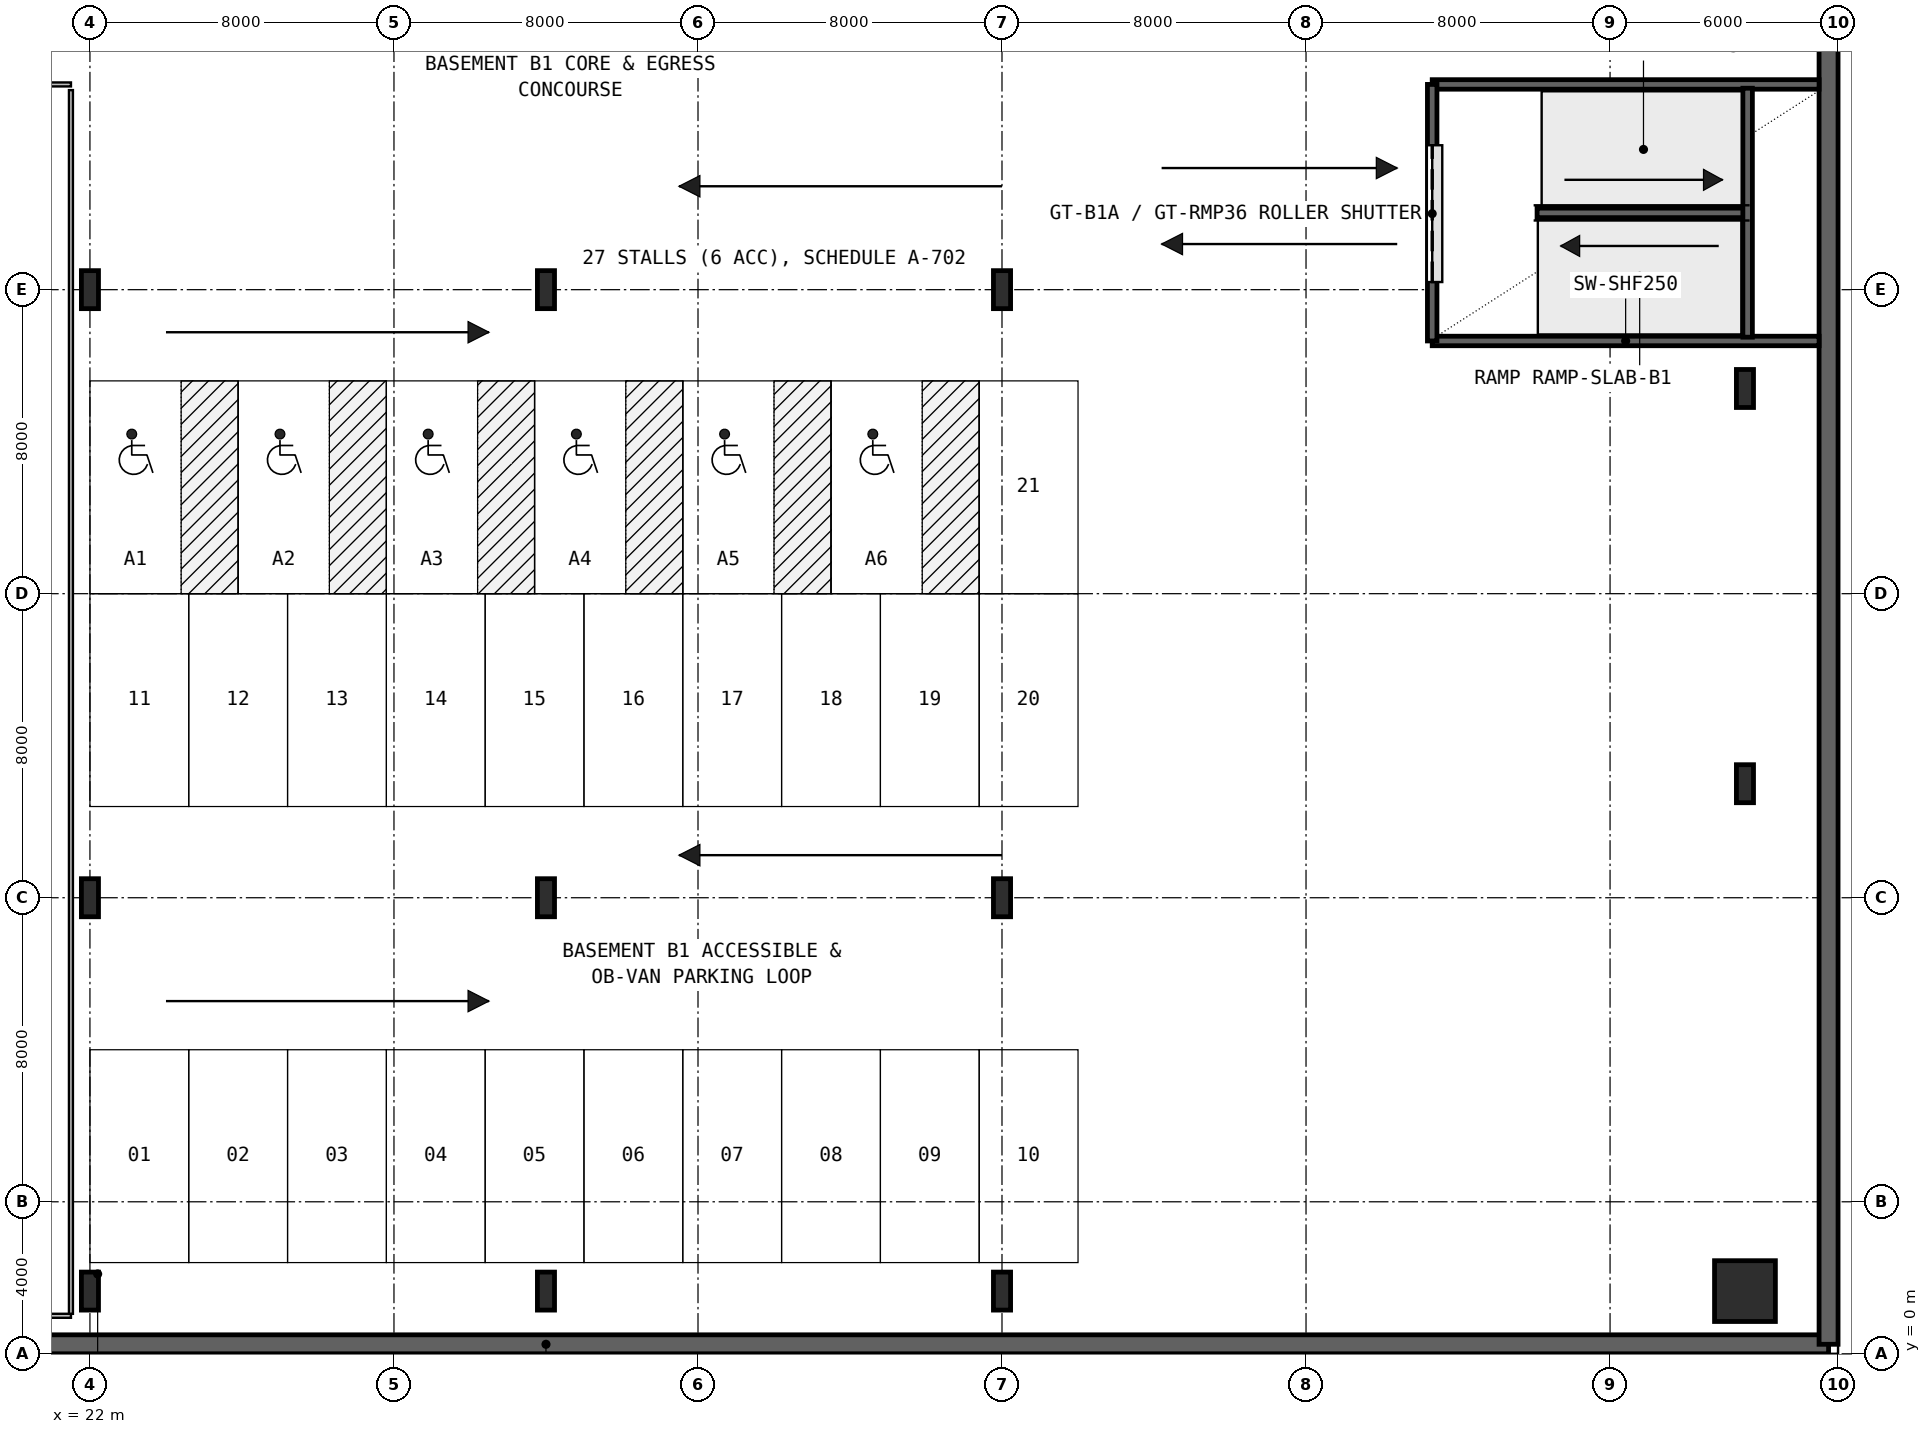
"""IFC4 building model, lengths in metres.
Left out: names, types, materials, properties, quantities, classifications, styles, units other than length and angle.
Written with IfcOpenShell. Run it as: python <this file> out.ifc"""

import sys

from ifc_helpers import new_model, si_unit, direction, frame, frame_2d, origin, origin_2d, place, context, subcontext, project, spatial, rectangle, hollow_rectangle, i_section, extrude, source, transform, mapped, element, fill, save


model = new_model("IFC4")
c1 = context("Model", 3, precision=1e-05, world=origin(), true_north=direction((0.0, 1.0)))
c2 = subcontext(c1, "Body", "Model", "MODEL_VIEW")
j1 = project(units=[si_unit("LENGTHUNIT", "METRE"), si_unit("PLANEANGLEUNIT", "RADIAN")], contexts=[c1])
p1 = place(None, origin())
s1 = spatial("IfcSite", under=j1, at=p1, CompositionType="ELEMENT")
p2 = place(p1, origin())
s2 = spatial("IfcBuilding", under=s1, at=p2, CompositionType="ELEMENT")
p3 = place(p2, frame((0.0, 0.0, -4.8)))
s3 = spatial("IfcBuildingStorey", under=s2, at=p3, CompositionType="ELEMENT", Elevation=-4.8)
p4 = place(p3, frame((0.25, 0.25, 0.0), z_axis=(0.0, 0.0, 1.0), x_axis=(1.0, 0.0, 0.0)))
e1 = element("IfcWall", 1, at=p4, inside=s3, PredefinedType="USERDEFINED", context=c2, shape_type="SweptSolid", body=[
    extrude(rectangle(XDim=67.5, YDim=0.5, at=frame_2d((33.75, 0.0))), origin(), (0.0, 0.0, 1.0), 4.48),
])
p5 = place(p3, frame((67.75, 0.25, 0.0), z_axis=(0.0, 0.0, 1.0), x_axis=(0.0, 1.0, 0.0)))
e2 = element("IfcWall", 2, at=p5, inside=s3, PredefinedType="USERDEFINED", context=c2, shape_type="SweptSolid", body=[
    extrude(rectangle(XDim=47.5, YDim=0.5, at=frame_2d((23.75, 0.0))), origin(), (0.0, 0.0, 1.0), 4.48),
])
m1 = source(origin(), c2, "Body", "SweptSolid", [
    extrude(hollow_rectangle(XDim=1.6, YDim=1.6, WallThickness=0.06, at=origin_2d()), origin(), (0.0, 0.0, 1.0), 4.8),
])
p6 = place(p3, frame((65.55, 1.65, 0.0), z_axis=(0.0, 0.0, 1.0), x_axis=(1.0, 0.0, 0.0)))
e3 = element("IfcColumn", 3, at=p6, inside=s3, PredefinedType="COLUMN", context=c2, shape_type="MappedRepresentation", body=[
    mapped(m1, transform((0.0, 0.0, 0.0), x_axis=(1.0, 0.0, 0.0), y_axis=(0.0, 1.0, 0.0), z_axis=(0.0, 0.0, 1.0), scale=1.0)),
])
m2 = source(origin(), c2, "Body", "SweptSolid", [
    extrude(i_section(OverallWidth=0.45, OverallDepth=1.0, WebThickness=0.016, FlangeThickness=0.03, FilletRadius=0.016, at=origin_2d()), origin(), (0.0, 0.0, 1.0), 4.8),
])
for number, where, z_axis, x_axis in (
    (4, (22.0, 1.65, 0.0), (0.0, 0.0, 1.0), (1.0, 0.0, 0.0)),
    (5, (34.0, 1.65, 0.0), (0.0, 0.0, 1.0), (1.0, 0.0, 0.0)),
    (6, (46.0, 1.65, 0.0), (0.0, 0.0, 1.0), (1.0, 0.0, 0.0)),
    (7, (22.0, 12.0, 0.0), (0.0, 0.0, 1.0), (1.0, 0.0, 0.0)),
    (8, (34.0, 12.0, 0.0), (0.0, 0.0, 1.0), (1.0, 0.0, 0.0)),
    (9, (46.0, 12.0, 0.0), (0.0, 0.0, 1.0), (1.0, 0.0, 0.0)),
    (10, (22.0, 28.0, 0.0), (0.0, 0.0, 1.0), (1.0, 0.0, 0.0)),
    (11, (34.0, 28.0, 0.0), (0.0, 0.0, 1.0), (1.0, 0.0, 0.0)),
    (12, (46.0, 28.0, 0.0), (0.0, 0.0, 1.0), (1.0, 0.0, 0.0)),
    (13, (65.55, 15.0, 0.0), (0.0, 0.0, 1.0), (1.0, 0.0, 0.0)),
    (14, (65.55, 25.4, 0.0), (0.0, 0.0, 1.0), (1.0, 0.0, 0.0)),
):
    element("IfcColumn", number, at=place(p3, frame(where, z_axis=z_axis, x_axis=x_axis)), inside=s3, PredefinedType="COLUMN", context=c2, shape_type="MappedRepresentation", body=[
        mapped(m2, transform((0.0, 0.0, 0.0), x_axis=(1.0, 0.0, 0.0), y_axis=(0.0, 1.0, 0.0), z_axis=(0.0, 0.0, 1.0), scale=1.0)),
    ])
for number, where, z_axis, x_axis in (
    (15, (57.32, 26.65, 0.0), (0.0, 0.0, 1.0), (1.0, 0.0, 0.0)),
    (16, (57.32, 33.4, 0.0), (0.0, 0.0, 1.0), (1.0, 0.0, 0.0)),
):
    element("IfcWall", number, at=place(p3, frame(where, z_axis=z_axis, x_axis=x_axis)), inside=s3, PredefinedType="SHEAR", context=c2, shape_type="SweptSolid", body=[
        extrude(rectangle(XDim=10.18, YDim=0.25, at=frame_2d((5.09, 0.0))), origin(), (0.0, 0.0, 1.0), 4.48),
    ])
p7 = place(p3, frame((60.08, 30.02, 0.0), z_axis=(0.0, 0.0, 1.0), x_axis=(1.0, 0.0, 0.0)))
e17 = element("IfcWall", 17, at=p7, inside=s3, PredefinedType="SHEAR", context=c2, shape_type="SweptSolid", body=[
    extrude(rectangle(XDim=5.48, YDim=0.25, at=frame_2d((2.74, 0.0))), origin(), (0.0, 0.0, 1.0), 4.8),
])
p8 = place(p3, frame((57.32, 26.65, 0.0), z_axis=(0.0, 0.0, 1.0), x_axis=(0.0, 1.0, 0.0)))
e18 = element("IfcWall", 18, at=p8, inside=s3, PredefinedType="SHEAR", context=c2, shape_type="SweptSolid", body=[
    extrude(rectangle(XDim=6.75, YDim=0.25, at=frame_2d((3.375, 0.0))), origin(), (0.0, 0.0, 1.0), 4.48),
])
p9 = place(p8, frame((1.55, 0.0, 0.0)))
e19 = element("IfcOpeningElement", 19, at=p9, cuts=e18, PredefinedType="OPENING", context=c2, shape_type="SweptSolid", body=[
    extrude(rectangle(XDim=3.6, YDim=2.35, at=frame_2d((1.8, 1.175))), frame((0.0, 0.135, 0.0), z_axis=(0.0, -1.0, 0.0), x_axis=(1.0, 0.0, 0.0)), (0.0, 0.0, 1.0), 0.27),
])
p10 = place(p3, frame((65.62, 26.75, 0.0), z_axis=(0.0, 0.0, 1.0), x_axis=(0.0, 1.0, 0.0)))
e20 = element("IfcWall", 20, at=p10, inside=s3, PredefinedType="SHEAR", context=c2, shape_type="SweptSolid", body=[
    extrude(rectangle(XDim=6.55, YDim=0.25, at=frame_2d((3.275, 0.0))), origin(), (0.0, 0.0, 1.0), 2.1),
])
p11 = place(p3, frame((1.0, 1.0, 0.0), z_axis=(0.0, 0.0, 1.0), x_axis=(1.0, 0.0, 0.0)))
e21 = element("IfcWall", 21, at=p11, inside=s3, PredefinedType="PARTITIONING", context=c2, shape_type="SweptSolid", body=[
    extrude(rectangle(XDim=20.5, YDim=0.105, at=frame_2d((10.25, 0.0))), origin(), (0.0, 0.0, 1.0), 3.275),
])
p12 = place(p3, frame((21.5, 1.052, 0.0), z_axis=(0.0, 0.0, 1.0), x_axis=(0.0, 1.0, 0.0)))
e22 = element("IfcWall", 22, at=p12, inside=s3, PredefinedType="PARTITIONING", context=c2, shape_type="SweptSolid", body=[
    extrude(rectangle(XDim=32.198, YDim=0.105, at=frame_2d((16.099, 0.0))), origin(), (0.0, 0.0, 1.0), 3.76),
])
p13 = place(p3, frame((1.0, 33.4, 0.0), z_axis=(0.0, 0.0, 1.0), x_axis=(1.0, 0.0, 0.0)))
e23 = element("IfcWall", 23, at=p13, inside=s3, PredefinedType="PARTITIONING", context=c2, shape_type="SweptSolid", body=[
    extrude(rectangle(XDim=20.5, YDim=0.105, at=frame_2d((10.25, 0.0))), origin(), (0.0, 0.0, 1.0), 3.76),
])
p14 = place(p13, frame((11.41, 0.0, 0.0)))
e24 = element("IfcOpeningElement", 24, at=p14, cuts=e23, PredefinedType="OPENING", context=c2, shape_type="SweptSolid", body=[
    extrude(rectangle(XDim=0.88, YDim=2.06, at=frame_2d((0.44, 1.03))), frame((0.0, 0.062, 0.0), z_axis=(0.0, -1.0, 0.0), x_axis=(1.0, 0.0, 0.0)), (0.0, 0.0, 1.0), 0.125),
])
m3 = source(origin(), c2, "Body", "SweptSolid", [
    extrude(rectangle(XDim=3.6, YDim=2.35, at=frame_2d((1.8, 1.175))), frame((0.0, 0.025, 0.0), z_axis=(0.0, -1.0, 0.0), x_axis=(1.0, 0.0, 0.0)), (0.0, 0.0, 1.0), 0.05),
])
p15 = place(p9, frame((3.6, 0.0, 0.0), z_axis=(0.0, 0.0, 1.0), x_axis=(-1.0, 0.0, 0.0)))
e25 = element("IfcDoor", 25, at=p15, inside=s3, OperationType="ROLLINGUP", PredefinedType="GATE", context=c2, shape_type="MappedRepresentation", body=[
    mapped(m3, transform((0.0, 0.0, 0.0), x_axis=(1.0, 0.0, 0.0), y_axis=(0.0, 1.0, 0.0), z_axis=(0.0, 0.0, 1.0), scale=1.0)),
])
fill(e19, e25)
save(model, sys.argv[1])
